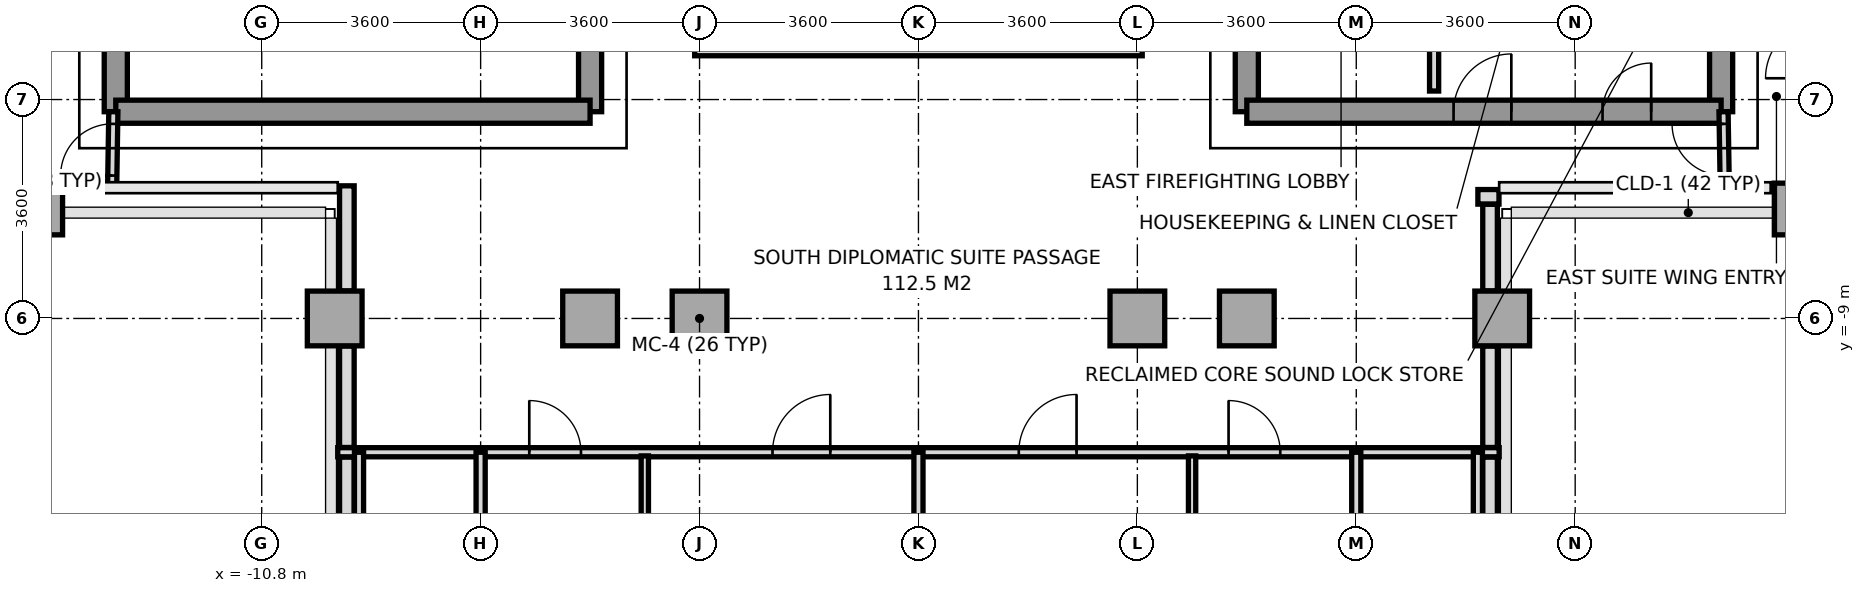
"""IFC4 building model, lengths in metres.
Left out: names, types, materials, properties, quantities, classifications, styles, units other than length and angle.
Written with IfcOpenShell. Run it as: python <this file> out.ifc"""

import sys

from ifc_helpers import new_model, si_unit, direction, frame, frame_2d, origin, origin_2d, place, context, subcontext, project, spatial, rectangle, extrude, source, transform, mapped, element, fill, save


model = new_model("IFC4")
c1 = context("Model", 3, precision=1e-05, world=origin(), true_north=direction((0.0, 1.0)))
c2 = subcontext(c1, "Body", "Model", "MODEL_VIEW")
j1 = project(units=[si_unit("LENGTHUNIT", "METRE"), si_unit("PLANEANGLEUNIT", "RADIAN")], contexts=[c1])
p1 = place(None, origin())
s1 = spatial("IfcSite", under=j1, at=p1, CompositionType="ELEMENT")
p2 = place(p1, origin())
s2 = spatial("IfcBuilding", under=s1, at=p2, CompositionType="ELEMENT")
p3 = place(p2, frame((0.0, 0.0, 194.4)))
s3 = spatial("IfcBuildingStorey", under=s2, at=p3, CompositionType="ELEMENT", Elevation=194.4)
m1 = source(origin(), c2, "Body", "SweptSolid", [
    extrude(rectangle(XDim=0.65, YDim=0.85, at=origin_2d()), origin(), (0.0, 0.0, 1.0), 3.2),
])
p4 = place(p3, frame((-14.4, -7.2, 0.0), z_axis=(0.0, 0.0, 1.0), x_axis=(1.0, 0.0, 0.0)))
e1 = element("IfcColumn", 1, at=p4, inside=s3, PredefinedType="COLUMN", context=c2, shape_type="MappedRepresentation", body=[
    mapped(m1, transform((0.0, 0.0, 0.0), x_axis=(1.0, 0.0, 0.0), y_axis=(0.0, 1.0, 0.0), z_axis=(0.0, 0.0, 1.0), scale=1.0)),
])
m2 = source(origin(), c2, "Body", "SweptSolid", [
    extrude(rectangle(XDim=0.9, YDim=0.9, at=origin_2d()), origin(), (0.0, 0.0, 1.0), 3.2),
])
for number, where, z_axis, x_axis in (
    (2, (-9.6, -9.0, 0.0), (0.0, 0.0, 1.0), (1.0, 0.0, 0.0)),
    (3, (-5.4, -9.0, 0.0), (0.0, 0.0, 1.0), (1.0, 0.0, 0.0)),
    (4, (-3.6, -9.0, 0.0), (0.0, 0.0, 1.0), (1.0, 0.0, 0.0)),
    (5, (3.6, -9.0, 0.0), (0.0, 0.0, 1.0), (1.0, 0.0, 0.0)),
    (6, (5.4, -9.0, 0.0), (0.0, 0.0, 1.0), (1.0, 0.0, 0.0)),
    (7, (9.6, -9.0, 0.0), (0.0, 0.0, 1.0), (1.0, 0.0, 0.0)),
):
    element("IfcColumn", number, at=place(p3, frame(where, z_axis=z_axis, x_axis=x_axis)), inside=s3, PredefinedType="COLUMN", context=c2, shape_type="MappedRepresentation", body=[
        mapped(m2, transform((0.0, 0.0, 0.0), x_axis=(1.0, 0.0, 0.0), y_axis=(0.0, 1.0, 0.0), z_axis=(0.0, 0.0, 1.0), scale=1.0)),
    ])
p5 = place(p3, frame((14.4, -7.2, 0.0), z_axis=(0.0, 0.0, 1.0), x_axis=(1.0, 0.0, 0.0)))
e8 = element("IfcColumn", 8, at=p5, inside=s3, PredefinedType="COLUMN", context=c2, shape_type="MappedRepresentation", body=[
    mapped(m1, transform((0.0, 0.0, 0.0), x_axis=(1.0, 0.0, 0.0), y_axis=(0.0, 1.0, 0.0), z_axis=(0.0, 0.0, 1.0), scale=1.0)),
])
p6 = place(p3, frame((9.547, -7.0, 0.0), z_axis=(0.0, 0.0, 1.0), x_axis=(-1.0, 0.0, 0.0)))
e9 = element("IfcWall", 9, at=p6, inside=s3, PredefinedType="PARAPET", context=c2, shape_type="SweptSolid", body=[
    extrude(rectangle(XDim=0.347, YDim=0.24, at=frame_2d((0.174, 0.0))), origin(), (0.0, 0.0, 1.0), 1.15),
])
p7 = place(p3, frame((9.4, -7.123, 0.0), z_axis=(0.0, 0.0, 1.0), x_axis=(0.0, -1.0, 0.0)))
e10 = element("IfcWall", 10, at=p7, inside=s3, PredefinedType="PARAPET", context=c2, shape_type="SweptSolid", body=[
    extrude(rectangle(XDim=1.424, YDim=0.24, at=frame_2d((0.712, 0.0))), origin(), (0.0, 0.0, 1.0), 1.15),
])
p8 = place(p3, frame((9.4, -9.453, 0.0), z_axis=(0.0, 0.0, 1.0), x_axis=(0.0, -1.0, 0.0)))
e11 = element("IfcWall", 11, at=p8, inside=s3, PredefinedType="PARAPET", context=c2, shape_type="SweptSolid", body=[
    extrude(rectangle(XDim=1.669, YDim=0.24, at=frame_2d((0.834, 0.0))), origin(), (0.0, 0.0, 1.0), 1.15),
])
p9 = place(p3, frame((9.4, -11.278, 0.0), z_axis=(0.0, 0.0, 1.0), x_axis=(0.0, -1.0, 0.0)))
e12 = element("IfcWall", 12, at=p9, inside=s3, PredefinedType="PARAPET", context=c2, shape_type="SweptSolid", body=[
    extrude(rectangle(XDim=4.325, YDim=0.24, at=frame_2d((2.162, 0.0))), origin(), (0.0, 0.0, 1.0), 1.15),
])
p10 = place(p3, frame((-9.4, -15.358, 0.0), z_axis=(0.0, 0.0, 1.0), x_axis=(0.0, 1.0, 0.0)))
e13 = element("IfcWall", 13, at=p10, inside=s3, PredefinedType="PARAPET", context=c2, shape_type="SweptSolid", body=[
    extrude(rectangle(XDim=4.08, YDim=0.24, at=frame_2d((2.04, 0.0))), origin(), (0.0, 0.0, 1.0), 1.15),
])
p11 = place(p3, frame((-9.4, -11.122, 0.0), z_axis=(0.0, 0.0, 1.0), x_axis=(0.0, 1.0, 0.0)))
e14 = element("IfcWall", 14, at=p11, inside=s3, PredefinedType="PARAPET", context=c2, shape_type="SweptSolid", body=[
    extrude(rectangle(XDim=1.669, YDim=0.24, at=frame_2d((0.834, 0.0))), origin(), (0.0, 0.0, 1.0), 1.15),
])
p12 = place(p3, frame((-9.4, -8.547, 0.0), z_axis=(0.0, 0.0, 1.0), x_axis=(0.0, 1.0, 0.0)))
e15 = element("IfcWall", 15, at=p12, inside=s3, PredefinedType="PARAPET", context=c2, shape_type="SweptSolid", body=[
    extrude(rectangle(XDim=1.728, YDim=0.24, at=frame_2d((0.864, 0.0))), origin(), (0.0, 0.0, 1.0), 1.15),
])
p13 = place(p3, frame((-13.2, -5.6, 0.0), z_axis=(0.0, 0.0, 1.0), x_axis=(0.0, 1.0, 0.0)))
e16 = element("IfcWall", 16, at=p13, inside=s3, PredefinedType="SHEAR", context=c2, shape_type="SweptSolid", body=[
    extrude(rectangle(XDim=11.2, YDim=0.38, at=frame_2d((5.6, 0.0))), origin(), (0.0, 0.0, 1.0), 3.2),
])
p14 = place(p3, frame((-5.4, -5.6, 0.0), z_axis=(0.0, 0.0, 1.0), x_axis=(0.0, 1.0, 0.0)))
e17 = element("IfcWall", 17, at=p14, inside=s3, PredefinedType="SHEAR", context=c2, shape_type="SweptSolid", body=[
    extrude(rectangle(XDim=12.5, YDim=0.38, at=frame_2d((6.25, 0.0))), origin(), (0.0, 0.0, 1.0), 3.2),
])
p15 = place(p14, frame((4.55, 0.0, 0.0)))
e18 = element("IfcOpeningElement", 18, at=p15, cuts=e17, PredefinedType="OPENING", context=c2, shape_type="SweptSolid", body=[
    extrude(rectangle(XDim=1.2, YDim=2.2, at=frame_2d((0.6, 1.1))), frame((0.0, 0.2, 0.0), z_axis=(0.0, -1.0, 0.0), x_axis=(1.0, 0.0, 0.0)), (0.0, 0.0, 1.0), 0.4),
])
p16 = place(p14, frame((10.45, 0.0, 0.0)))
e19 = element("IfcOpeningElement", 19, at=p16, cuts=e17, PredefinedType="OPENING", context=c2, shape_type="SweptSolid", body=[
    extrude(rectangle(XDim=1.2, YDim=2.2, at=frame_2d((0.6, 1.1))), frame((0.0, 0.2, 0.0), z_axis=(0.0, -1.0, 0.0), x_axis=(1.0, 0.0, 0.0)), (0.0, 0.0, 1.0), 0.4),
])
p17 = place(p3, frame((-13.2, -5.6, 0.0), z_axis=(0.0, 0.0, 1.0), x_axis=(1.0, 0.0, 0.0)))
e20 = element("IfcWall", 20, at=p17, inside=s3, PredefinedType="SHEAR", context=c2, shape_type="SweptSolid", body=[
    extrude(rectangle(XDim=7.8, YDim=0.38, at=frame_2d((3.9, 0.0))), origin(), (0.0, 0.0, 1.0), 3.2),
])
p18 = place(p3, frame((13.2, -5.6, 0.0), z_axis=(0.0, 0.0, 1.0), x_axis=(0.0, 1.0, 0.0)))
e21 = element("IfcWall", 21, at=p18, inside=s3, PredefinedType="SHEAR", context=c2, shape_type="SweptSolid", body=[
    extrude(rectangle(XDim=11.2, YDim=0.38, at=frame_2d((5.6, 0.0))), origin(), (0.0, 0.0, 1.0), 3.2),
])
p19 = place(p3, frame((5.4, -5.6, 0.0), z_axis=(0.0, 0.0, 1.0), x_axis=(0.0, 1.0, 0.0)))
e22 = element("IfcWall", 22, at=p19, inside=s3, PredefinedType="SHEAR", context=c2, shape_type="SweptSolid", body=[
    extrude(rectangle(XDim=12.5, YDim=0.38, at=frame_2d((6.25, 0.0))), origin(), (0.0, 0.0, 1.0), 3.2),
])
p20 = place(p19, frame((4.55, 0.0, 0.0)))
e23 = element("IfcOpeningElement", 23, at=p20, cuts=e22, PredefinedType="OPENING", context=c2, shape_type="SweptSolid", body=[
    extrude(rectangle(XDim=1.2, YDim=2.2, at=frame_2d((0.6, 1.1))), frame((0.0, 0.2, 0.0), z_axis=(0.0, -1.0, 0.0), x_axis=(1.0, 0.0, 0.0)), (0.0, 0.0, 1.0), 0.4),
])
p21 = place(p19, frame((10.45, 0.0, 0.0)))
e24 = element("IfcOpeningElement", 24, at=p21, cuts=e22, PredefinedType="OPENING", context=c2, shape_type="SweptSolid", body=[
    extrude(rectangle(XDim=1.2, YDim=2.2, at=frame_2d((0.6, 1.1))), frame((0.0, 0.2, 0.0), z_axis=(0.0, -1.0, 0.0), x_axis=(1.0, 0.0, 0.0)), (0.0, 0.0, 1.0), 0.4),
])
p22 = place(p19, frame((7.88, 0.0, 0.0)))
e25 = element("IfcOpeningElement", 25, at=p22, cuts=e22, PredefinedType="OPENING", context=c2, shape_type="SweptSolid", body=[
    extrude(rectangle(XDim=0.8, YDim=2.1, at=frame_2d((0.4, 1.05))), frame((0.0, 0.2, 0.0), z_axis=(0.0, -1.0, 0.0), x_axis=(1.0, 0.0, 0.0)), (0.0, 0.0, 1.0), 0.4),
])
p23 = place(p3, frame((5.4, -5.6, 0.0), z_axis=(0.0, 0.0, 1.0), x_axis=(1.0, 0.0, 0.0)))
e26 = element("IfcWall", 26, at=p23, inside=s3, PredefinedType="SHEAR", context=c2, shape_type="SweptSolid", body=[
    extrude(rectangle(XDim=7.8, YDim=0.38, at=frame_2d((3.9, 0.0))), origin(), (0.0, 0.0, 1.0), 3.2),
])
p24 = place(p23, frame((5.85, 0.0, 0.0)))
e27 = element("IfcOpeningElement", 27, at=p24, cuts=e26, PredefinedType="OPENING", context=c2, shape_type="SweptSolid", body=[
    extrude(rectangle(XDim=0.8, YDim=2.1, at=frame_2d((0.4, 1.05))), frame((0.0, 0.2, 0.0), z_axis=(0.0, -1.0, 0.0), x_axis=(1.0, 0.0, 0.0)), (0.0, 0.0, 1.0), 0.4),
])
p25 = place(p23, frame((3.4, 0.0, 0.0)))
e28 = element("IfcOpeningElement", 28, at=p25, cuts=e26, PredefinedType="OPENING", context=c2, shape_type="SweptSolid", body=[
    extrude(rectangle(XDim=0.95, YDim=2.15, at=frame_2d((0.475, 1.075))), frame((0.0, 0.2, 0.0), z_axis=(0.0, -1.0, 0.0), x_axis=(1.0, 0.0, 0.0)), (0.0, 0.0, 1.0), 0.4),
])
p26 = place(p3, frame((8.48, -5.26, 0.0), z_axis=(0.0, 0.0, 1.0), x_axis=(0.0, 1.0, 0.0)))
e29 = element("IfcWall", 29, at=p26, inside=s3, PredefinedType="PARTITIONING", context=c2, shape_type="SweptSolid", body=[
    extrude(rectangle(XDim=2.94, YDim=0.15, at=frame_2d((1.47, 0.0))), origin(), (0.0, 0.0, 1.0), 3.2),
])
p27 = place(p3, frame((-9.55, -11.2, 0.0), z_axis=(0.0, 0.0, 1.0), x_axis=(1.0, 0.0, 0.0)))
e30 = element("IfcWall", 30, at=p27, inside=s3, PredefinedType="PARTITIONING", context=c2, shape_type="SweptSolid", body=[
    extrude(rectangle(XDim=19.1, YDim=0.15, at=frame_2d((9.55, 0.0))), origin(), (0.0, 0.0, 1.0), 3.2),
])
p28 = place(p27, frame((3.15, 0.0, 0.0)))
e31 = element("IfcOpeningElement", 31, at=p28, cuts=e30, PredefinedType="OPENING", context=c2, shape_type="SweptSolid", body=[
    extrude(rectangle(XDim=0.85, YDim=2.1, at=frame_2d((0.425, 1.05))), frame((0.0, 0.085, 0.0), z_axis=(0.0, -1.0, 0.0), x_axis=(1.0, 0.0, 0.0)), (0.0, 0.0, 1.0), 0.17),
])
p29 = place(p27, frame((7.15, 0.0, 0.0)))
e32 = element("IfcOpeningElement", 32, at=p29, cuts=e30, PredefinedType="OPENING", context=c2, shape_type="SweptSolid", body=[
    extrude(rectangle(XDim=0.95, YDim=2.15, at=frame_2d((0.475, 1.075))), frame((0.0, 0.085, 0.0), z_axis=(0.0, -1.0, 0.0), x_axis=(1.0, 0.0, 0.0)), (0.0, 0.0, 1.0), 0.17),
])
p30 = place(p27, frame((14.65, 0.0, 0.0)))
e33 = element("IfcOpeningElement", 33, at=p30, cuts=e30, PredefinedType="OPENING", context=c2, shape_type="SweptSolid", body=[
    extrude(rectangle(XDim=0.85, YDim=2.1, at=frame_2d((0.425, 1.05))), frame((0.0, 0.085, 0.0), z_axis=(0.0, -1.0, 0.0), x_axis=(1.0, 0.0, 0.0)), (0.0, 0.0, 1.0), 0.17),
])
p31 = place(p27, frame((11.2, 0.0, 0.0)))
e34 = element("IfcOpeningElement", 34, at=p31, cuts=e30, PredefinedType="OPENING", context=c2, shape_type="SweptSolid", body=[
    extrude(rectangle(XDim=0.95, YDim=2.15, at=frame_2d((0.475, 1.075))), frame((0.0, 0.085, 0.0), z_axis=(0.0, -1.0, 0.0), x_axis=(1.0, 0.0, 0.0)), (0.0, 0.0, 1.0), 0.17),
])
for number, where, z_axis, x_axis in (
    (35, (-9.2, -15.68, 0.0), (0.0, 0.0, 1.0), (0.0, 1.0, 0.0)),
    (36, (9.2, -15.68, 0.0), (0.0, 0.0, 1.0), (0.0, 1.0, 0.0)),
):
    element("IfcWall", number, at=place(p3, frame(where, z_axis=z_axis, x_axis=x_axis)), inside=s3, PredefinedType="PARTITIONING", context=c2, shape_type="SweptSolid", body=[
        extrude(rectangle(XDim=4.48, YDim=0.15, at=frame_2d((2.24, 0.0))), origin(), (0.0, 0.0, 1.0), 3.2),
    ])
p32 = place(p3, frame((-7.2, -23.4, 0.0), z_axis=(0.0, 0.0, 1.0), x_axis=(0.0, 1.0, 0.0)))
e37 = element("IfcWall", 37, at=p32, inside=s3, PredefinedType="PARTITIONING", context=c2, shape_type="SweptSolid", body=[
    extrude(rectangle(XDim=12.2, YDim=0.15, at=frame_2d((6.1, 0.0))), origin(), (0.0, 0.0, 1.0), 2.75),
])
p33 = place(p3, frame((0.0, -24.65, 0.0), z_axis=(0.0, 0.0, 1.0), x_axis=(0.0, 1.0, 0.0)))
e38 = element("IfcWall", 38, at=p33, inside=s3, PredefinedType="PARTITIONING", context=c2, shape_type="SweptSolid", body=[
    extrude(rectangle(XDim=13.45, YDim=0.15, at=frame_2d((6.725, 0.0))), origin(), (0.0, 0.0, 1.0), 2.75),
])
p34 = place(p3, frame((7.2, -23.4, 0.0), z_axis=(0.0, 0.0, 1.0), x_axis=(0.0, 1.0, 0.0)))
e39 = element("IfcWall", 39, at=p34, inside=s3, PredefinedType="PARTITIONING", context=c2, shape_type="SweptSolid", body=[
    extrude(rectangle(XDim=12.2, YDim=0.15, at=frame_2d((6.1, 0.0))), origin(), (0.0, 0.0, 1.0), 2.75),
])
for number, where, z_axis, x_axis in (
    (40, (-4.5, -14.36, 0.0), (0.0, 0.0, 1.0), (0.0, 1.0, 0.0)),
    (41, (4.5, -14.36, 0.0), (0.0, 0.0, 1.0), (0.0, 1.0, 0.0)),
):
    element("IfcWall", number, at=place(p3, frame(where, z_axis=z_axis, x_axis=x_axis)), inside=s3, PredefinedType="PARTITIONING", context=c2, shape_type="SweptSolid", body=[
        extrude(rectangle(XDim=3.1, YDim=0.12, at=frame_2d((1.55, 0.0))), origin(), (0.0, 0.0, 1.0), 2.75),
    ])
p35 = place(p3, frame((-13.26, -6.85, 0.0), z_axis=(0.0, 0.0, 1.0), x_axis=(0.016013571389, 0.999871774545, 0.0)))
e42 = element("IfcWall", 42, at=p35, inside=s3, PredefinedType="PARTITIONING", context=c2, shape_type="SweptSolid", body=[
    extrude(rectangle(XDim=1.25, YDim=0.15, at=frame_2d((0.625, 0.0))), origin(), (0.0, 0.0, 1.0), 3.2),
])
p36 = place(p35, frame((0.2, 0.0, 0.0)))
e43 = element("IfcOpeningElement", 43, at=p36, cuts=e42, PredefinedType="OPENING", context=c2, shape_type="SweptSolid", body=[
    extrude(rectangle(XDim=0.85, YDim=2.1, at=frame_2d((0.425, 1.05))), frame((0.0, 0.085, 0.0), z_axis=(0.0, -1.0, 0.0), x_axis=(1.0, 0.0, 0.0)), (0.0, 0.0, 1.0), 0.17),
])
p37 = place(p3, frame((13.26, -6.85, 0.0), z_axis=(0.0, 0.0, 1.0), x_axis=(-0.016013571389, 0.999871774545, 0.0)))
e44 = element("IfcWall", 44, at=p37, inside=s3, PredefinedType="PARTITIONING", context=c2, shape_type="SweptSolid", body=[
    extrude(rectangle(XDim=1.25, YDim=0.15, at=frame_2d((0.625, 0.0))), origin(), (0.0, 0.0, 1.0), 3.2),
])
p38 = place(p37, frame((0.2, 0.0, 0.0)))
e45 = element("IfcOpeningElement", 45, at=p38, cuts=e44, PredefinedType="OPENING", context=c2, shape_type="SweptSolid", body=[
    extrude(rectangle(XDim=0.85, YDim=2.1, at=frame_2d((0.425, 1.05))), frame((0.0, 0.085, 0.0), z_axis=(0.0, -1.0, 0.0), x_axis=(1.0, 0.0, 0.0)), (0.0, 0.0, 1.0), 0.17),
])
p39 = place(p3, frame((-3.68, -4.56, 0.0), z_axis=(0.0, 0.0, 1.0), x_axis=(1.0, 0.0, 0.0)))
e46 = element("IfcWall", 46, at=p39, inside=s3, PredefinedType="PARAPET", context=c2, shape_type="SweptSolid", body=[
    extrude(rectangle(XDim=7.36, YDim=0.24, at=frame_2d((3.68, 0.0))), origin(), (0.0, 0.0, 1.0), 1.15),
])
m3 = source(origin(), c2, "Body", "SweptSolid", [
    extrude(rectangle(XDim=0.8, YDim=2.1, at=frame_2d((0.4, 1.05))), frame((0.0, 0.025, 0.0), z_axis=(0.0, -1.0, 0.0), x_axis=(1.0, 0.0, 0.0)), (0.0, 0.0, 1.0), 0.05),
])
p40 = place(p24, origin())
e47 = element("IfcDoor", 47, at=p40, inside=s3, OperationType="SINGLE_SWING_RIGHT", PredefinedType="DOOR", context=c2, shape_type="MappedRepresentation", body=[
    mapped(m3, transform((0.0, 0.0, 0.0), x_axis=(1.0, 0.0, 0.0), y_axis=(0.0, 1.0, 0.0), z_axis=(0.0, 0.0, 1.0), scale=1.0)),
])
fill(e27, e47)
m4 = source(origin(), c2, "Body", "SweptSolid", [
    extrude(rectangle(XDim=0.95, YDim=2.15, at=frame_2d((0.475, 1.075))), frame((0.0, 0.025, 0.0), z_axis=(0.0, -1.0, 0.0), x_axis=(1.0, 0.0, 0.0)), (0.0, 0.0, 1.0), 0.05),
])
p41 = place(p25, origin())
e48 = element("IfcDoor", 48, at=p41, inside=s3, OperationType="SINGLE_SWING_RIGHT", PredefinedType="DOOR", context=c2, shape_type="MappedRepresentation", body=[
    mapped(m4, transform((0.0, 0.0, 0.0), x_axis=(1.0, 0.0, 0.0), y_axis=(0.0, 1.0, 0.0), z_axis=(0.0, 0.0, 1.0), scale=1.0)),
])
fill(e28, e48)
m5 = source(origin(), c2, "Body", "SweptSolid", [
    extrude(rectangle(XDim=0.85, YDim=2.1, at=frame_2d((0.425, 1.05))), frame((0.0, 0.025, 0.0), z_axis=(0.0, -1.0, 0.0), x_axis=(1.0, 0.0, 0.0)), (0.0, 0.0, 1.0), 0.05),
])
p42 = place(p28, origin())
e49 = element("IfcDoor", 49, at=p42, inside=s3, OperationType="SINGLE_SWING_LEFT", PredefinedType="DOOR", context=c2, shape_type="MappedRepresentation", body=[
    mapped(m5, transform((0.0, 0.0, 0.0), x_axis=(1.0, 0.0, 0.0), y_axis=(0.0, 1.0, 0.0), z_axis=(0.0, 0.0, 1.0), scale=1.0)),
])
fill(e31, e49)
p43 = place(p29, origin())
e50 = element("IfcDoor", 50, at=p43, inside=s3, OperationType="SINGLE_SWING_RIGHT", PredefinedType="DOOR", context=c2, shape_type="MappedRepresentation", body=[
    mapped(m4, transform((0.0, 0.0, 0.0), x_axis=(1.0, 0.0, 0.0), y_axis=(0.0, 1.0, 0.0), z_axis=(0.0, 0.0, 1.0), scale=1.0)),
])
fill(e32, e50)
p44 = place(p30, origin())
e51 = element("IfcDoor", 51, at=p44, inside=s3, OperationType="SINGLE_SWING_LEFT", PredefinedType="DOOR", context=c2, shape_type="MappedRepresentation", body=[
    mapped(m5, transform((0.0, 0.0, 0.0), x_axis=(1.0, 0.0, 0.0), y_axis=(0.0, 1.0, 0.0), z_axis=(0.0, 0.0, 1.0), scale=1.0)),
])
fill(e33, e51)
p45 = place(p31, origin())
e52 = element("IfcDoor", 52, at=p45, inside=s3, OperationType="SINGLE_SWING_RIGHT", PredefinedType="DOOR", context=c2, shape_type="MappedRepresentation", body=[
    mapped(m4, transform((0.0, 0.0, 0.0), x_axis=(1.0, 0.0, 0.0), y_axis=(0.0, 1.0, 0.0), z_axis=(0.0, 0.0, 1.0), scale=1.0)),
])
fill(e34, e52)
p46 = place(p36, origin())
e53 = element("IfcDoor", 53, at=p46, inside=s3, OperationType="SINGLE_SWING_LEFT", PredefinedType="DOOR", context=c2, shape_type="MappedRepresentation", body=[
    mapped(m5, transform((0.0, 0.0, 0.0), x_axis=(1.0, 0.0, 0.0), y_axis=(0.0, 1.0, 0.0), z_axis=(0.0, 0.0, 1.0), scale=1.0)),
])
fill(e43, e53)
p47 = place(p38, origin())
e54 = element("IfcDoor", 54, at=p47, inside=s3, OperationType="SINGLE_SWING_RIGHT", PredefinedType="DOOR", context=c2, shape_type="MappedRepresentation", body=[
    mapped(m5, transform((0.0, 0.0, 0.0), x_axis=(1.0, 0.0, 0.0), y_axis=(0.0, 1.0, 0.0), z_axis=(0.0, 0.0, 1.0), scale=1.0)),
])
fill(e45, e54)
save(model, sys.argv[1])
